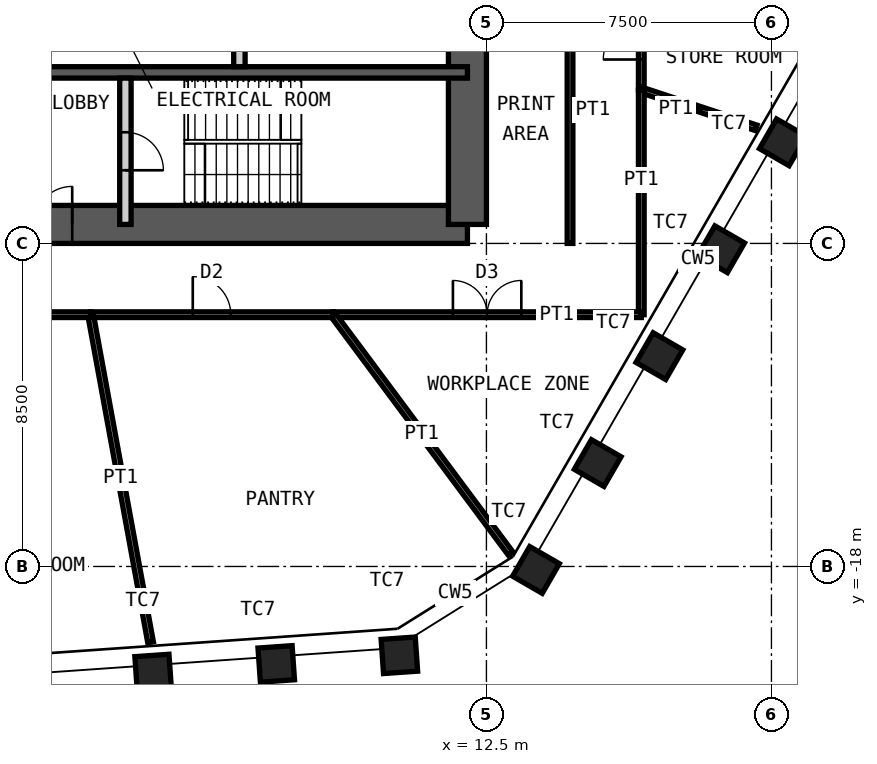
"""IFC4 building model, lengths in metres.
Left out: names, types, materials, properties, quantities, classifications, styles, units other than length and angle.
Written with IfcOpenShell. Run it as: python <this file> out.ifc"""

import sys

from ifc_helpers import new_model, si_unit, direction, frame, frame_2d, origin, origin_2d, place, context, subcontext, project, spatial, rectangle, hollow_rectangle, extrude, element, fill, save


model = new_model("IFC4")
c1 = context("Model", 3, precision=1e-05, world=origin(), true_north=direction((0.0, 1.0)))
c2 = subcontext(c1, "Body", "Model", "MODEL_VIEW")
j1 = project(units=[si_unit("LENGTHUNIT", "METRE"), si_unit("PLANEANGLEUNIT", "RADIAN")], contexts=[c1])
p1 = place(None, origin())
s1 = spatial("IfcSite", under=j1, at=p1, CompositionType="ELEMENT")
p2 = place(p1, origin())
s2 = spatial("IfcBuilding", under=s1, at=p2, CompositionType="ELEMENT")
p3 = place(p2, frame((0.0, 0.0, 283.0)))
s3 = spatial("IfcBuildingStorey", under=s2, at=p3, CompositionType="ELEMENT", Elevation=283.0)
for number, where, z_axis, x_axis in (
    (1, (20.3, -6.84, 0.0), (0.0, 0.0, 1.0), (0.5, 0.866, 0.0)),
    (2, (18.676, -9.653, 0.0), (0.0, 0.0, 1.0), (0.5, 0.866, 0.0)),
    (3, (17.052, -12.466, 0.0), (0.0, 0.0, 1.0), (0.5, 0.866, 0.0)),
    (4, (15.427, -15.279, 0.0), (0.0, 0.0, 1.0), (0.5, 0.866, 0.0)),
    (5, (13.803, -18.092, 0.0), (0.0, 0.0, 1.0), (0.5, 0.866, 0.0)),
    (6, (10.209, -20.337, 0.0), (0.0, 0.0, 1.0), (0.998, 0.07, 0.0)),
    (7, (6.969, -20.564, 0.0), (0.0, 0.0, 1.0), (0.998, 0.07, 0.0)),
    (8, (3.729, -20.791, 0.0), (0.0, 0.0, 1.0), (0.998, 0.07, 0.0)),
):
    element("IfcColumn", number, at=place(p3, frame(where, z_axis=z_axis, x_axis=x_axis)), inside=s3, PredefinedType="COLUMN", context=c2, shape_type="SweptSolid", body=[
        extrude(hollow_rectangle(XDim=0.9, YDim=0.9, WallThickness=0.06, at=origin_2d()), origin(), (0.0, 0.0, 1.0), 4.2),
    ])
p4 = place(p3, frame((-12.0, -9.0, 0.0), z_axis=(0.0, 0.0, 1.0), x_axis=(1.0, 0.0, 0.0)))
e9 = element("IfcWall", 9, at=p4, inside=s3, PredefinedType="SHEAR", context=c2, shape_type="SweptSolid", body=[
    extrude(rectangle(XDim=24.0, YDim=1.0, at=frame_2d((12.0, 0.0))), origin(), (0.0, 0.0, 1.0), 4.2),
])
p5 = place(p4, frame((1.35, 0.0, 0.0)))
e10 = element("IfcOpeningElement", 10, at=p5, cuts=e9, PredefinedType="OPENING", context=c2, shape_type="SweptSolid", body=[
    extrude(rectangle(XDim=1.0, YDim=2.1, at=frame_2d((0.5, 1.05))), frame((0.0, 0.51, 0.0), z_axis=(0.0, -1.0, 0.0), x_axis=(1.0, 0.0, 0.0)), (0.0, 0.0, 1.0), 1.02),
])
p6 = place(p4, frame((5.325, 0.0, 0.0)))
e11 = element("IfcOpeningElement", 11, at=p6, cuts=e9, PredefinedType="OPENING", context=c2, shape_type="SweptSolid", body=[
    extrude(rectangle(XDim=1.15, YDim=2.1, at=frame_2d((0.575, 1.05))), frame((0.0, 0.51, 0.0), z_axis=(0.0, -1.0, 0.0), x_axis=(1.0, 0.0, 0.0)), (0.0, 0.0, 1.0), 1.02),
])
p7 = place(p4, frame((12.6, 0.0, 0.0)))
e12 = element("IfcOpeningElement", 12, at=p7, cuts=e9, PredefinedType="OPENING", context=c2, shape_type="SweptSolid", body=[
    extrude(rectangle(XDim=1.0, YDim=2.1, at=frame_2d((0.5, 1.05))), frame((0.0, 0.51, 0.0), z_axis=(0.0, -1.0, 0.0), x_axis=(1.0, 0.0, 0.0)), (0.0, 0.0, 1.0), 1.02),
])
p8 = place(p3, frame((12.0, -9.0, 0.0), z_axis=(0.0, 0.0, 1.0), x_axis=(0.0, 1.0, 0.0)))
e13 = element("IfcWall", 13, at=p8, inside=s3, PredefinedType="SHEAR", context=c2, shape_type="SweptSolid", body=[
    extrude(rectangle(XDim=18.0, YDim=1.0, at=frame_2d((9.0, 0.0))), origin(), (0.0, 0.0, 1.0), 4.2),
])
p9 = place(p8, frame((8.1, 0.0, 0.0)))
e14 = element("IfcOpeningElement", 14, at=p9, cuts=e13, PredefinedType="OPENING", context=c2, shape_type="SweptSolid", body=[
    extrude(rectangle(XDim=1.8, YDim=2.1, at=frame_2d((0.9, 1.05))), frame((0.0, 0.51, 0.0), z_axis=(0.0, -1.0, 0.0), x_axis=(1.0, 0.0, 0.0)), (0.0, 0.0, 1.0), 1.02),
])
p10 = place(p3, frame((-12.0, -5.0, 0.0), z_axis=(0.0, 0.0, 1.0), x_axis=(1.0, 0.0, 0.0)))
e15 = element("IfcWall", 15, at=p10, inside=s3, PredefinedType="SHEAR", context=c2, shape_type="SweptSolid", body=[
    extrude(rectangle(XDim=24.0, YDim=0.3, at=frame_2d((12.0, 0.0))), origin(), (0.0, 0.0, 1.0), 4.2),
])
p11 = place(p3, frame((6.0, -4.85, 0.0), z_axis=(0.0, 0.0, 1.0), x_axis=(0.0, 1.0, 0.0)))
e16 = element("IfcWall", 16, at=p11, inside=s3, PredefinedType="PARTITIONING", context=c2, shape_type="SweptSolid", body=[
    extrude(rectangle(XDim=2.65, YDim=0.3, at=frame_2d((1.325, 0.0))), origin(), (0.0, 0.0, 1.0), 3.98),
])
p12 = place(p3, frame((3.0, -9.0, 0.0), z_axis=(0.0, 0.0, 1.0), x_axis=(0.0, 1.0, 0.0)))
e17 = element("IfcWall", 17, at=p12, inside=s3, PredefinedType="PARTITIONING", context=c2, shape_type="SweptSolid", body=[
    extrude(rectangle(XDim=3.85, YDim=0.3, at=frame_2d((1.925, 0.0))), origin(), (0.0, 0.0, 1.0), 3.98),
])
p13 = place(p12, frame((1.425, 0.0, 0.0)))
e18 = element("IfcOpeningElement", 18, at=p13, cuts=e17, PredefinedType="OPENING", context=c2, shape_type="SweptSolid", body=[
    extrude(rectangle(XDim=1.0, YDim=2.1, at=frame_2d((0.5, 1.05))), frame((0.0, 0.16, 0.0), z_axis=(0.0, -1.0, 0.0), x_axis=(1.0, 0.0, 0.0)), (0.0, 0.0, 1.0), 0.32),
])
p14 = place(p3, frame((16.575, -2.859, 0.0), z_axis=(0.0, 0.0, 1.0), x_axis=(0.0, -1.0, 0.0)))
e19 = element("IfcWall", 19, at=p14, inside=s3, PredefinedType="PARTITIONING", context=c2, shape_type="SweptSolid", body=[
    extrude(rectangle(XDim=2.603, YDim=0.15, at=frame_2d((1.302, 0.0))), origin(), (0.0, 0.0, 1.0), 4.03),
])
p15 = place(p14, frame((0.802, 0.0, 0.0)))
e20 = element("IfcOpeningElement", 20, at=p15, cuts=e19, PredefinedType="OPENING", context=c2, shape_type="SweptSolid", body=[
    extrude(rectangle(XDim=1.0, YDim=2.4, at=frame_2d((0.5, 1.2))), frame((0.0, 0.085, 0.0), z_axis=(0.0, -1.0, 0.0), x_axis=(1.0, 0.0, 0.0)), (0.0, 0.0, 1.0), 0.17),
])
p16 = place(p3, frame((19.598, -6.459, 0.0), z_axis=(0.0, 0.0, 1.0), x_axis=(-0.949759114669, 0.312981827113, 0.0)))
e21 = element("IfcWall", 21, at=p16, inside=s3, PredefinedType="PARTITIONING", context=c2, shape_type="SweptSolid", body=[
    extrude(rectangle(XDim=3.183, YDim=0.15, at=frame_2d((1.592, 0.0))), origin(), (0.0, 0.0, 1.0), 3.33),
])
p17 = place(p3, frame((16.575, -5.462, 0.0), z_axis=(0.0, 0.0, 1.0), x_axis=(0.0, -1.0, 0.0)))
e22 = element("IfcWall", 22, at=p17, inside=s3, PredefinedType="PARTITIONING", context=c2, shape_type="SweptSolid", body=[
    extrude(rectangle(XDim=5.913, YDim=0.15, at=frame_2d((2.956, 0.0))), origin(), (0.0, 0.0, 1.0), 4.03),
])
p18 = place(p3, frame((16.575, -11.375, 0.0), z_axis=(0.0, 0.0, 1.0), x_axis=(-1.0, 0.0, 0.0)))
e23 = element("IfcWall", 23, at=p18, inside=s3, PredefinedType="PARTITIONING", context=c2, shape_type="SweptSolid", body=[
    extrude(rectangle(XDim=8.114, YDim=0.15, at=frame_2d((4.057, 0.0))), origin(), (0.0, 0.0, 1.0), 4.03),
])
p19 = place(p18, frame((3.157, 0.0, 0.0)))
e24 = element("IfcOpeningElement", 24, at=p19, cuts=e23, PredefinedType="OPENING", context=c2, shape_type="SweptSolid", body=[
    extrude(rectangle(XDim=1.8, YDim=2.4, at=frame_2d((0.9, 1.2))), frame((0.0, 0.085, 0.0), z_axis=(0.0, -1.0, 0.0), x_axis=(1.0, 0.0, 0.0)), (0.0, 0.0, 1.0), 0.17),
])
p20 = place(p3, frame((13.138, -17.661, 0.0), z_axis=(0.0, 0.0, 1.0), x_axis=(-0.596849390438, 0.802353291969, 0.0)))
e25 = element("IfcWall", 25, at=p20, inside=s3, PredefinedType="PARTITIONING", context=c2, shape_type="SweptSolid", body=[
    extrude(rectangle(XDim=7.835, YDim=0.15, at=frame_2d((3.917, 0.0))), origin(), (0.0, 0.0, 1.0), 2.93),
])
p21 = place(p3, frame((8.461, -11.375, 0.0), z_axis=(0.0, 0.0, 1.0), x_axis=(-1.0, 0.0, 0.0)))
e26 = element("IfcWall", 26, at=p21, inside=s3, PredefinedType="PARTITIONING", context=c2, shape_type="SweptSolid", body=[
    extrude(rectangle(XDim=6.378, YDim=0.15, at=frame_2d((3.189, 0.0))), origin(), (0.0, 0.0, 1.0), 4.03),
])
p22 = place(p21, frame((2.689, 0.0, 0.0)))
e27 = element("IfcOpeningElement", 27, at=p22, cuts=e26, PredefinedType="OPENING", context=c2, shape_type="SweptSolid", body=[
    extrude(rectangle(XDim=1.0, YDim=2.4, at=frame_2d((0.5, 1.2))), frame((0.0, 0.085, 0.0), z_axis=(0.0, -1.0, 0.0), x_axis=(1.0, 0.0, 0.0)), (0.0, 0.0, 1.0), 0.17),
])
p23 = place(p3, frame((3.662, -19.994, 0.0), z_axis=(0.0, 0.0, 1.0), x_axis=(-0.18018724377, 0.983632328252, 0.0)))
e28 = element("IfcWall", 28, at=p23, inside=s3, PredefinedType="PARTITIONING", context=c2, shape_type="SweptSolid", body=[
    extrude(rectangle(XDim=8.762, YDim=0.15, at=frame_2d((4.381, 0.0))), origin(), (0.0, 0.0, 1.0), 3.33),
])
p24 = place(p3, frame((2.083, -11.375, 0.0), z_axis=(0.0, 0.0, 1.0), x_axis=(-1.0, 0.0, 0.0)))
e29 = element("IfcWall", 29, at=p24, inside=s3, PredefinedType="PARTITIONING", context=c2, shape_type="SweptSolid", body=[
    extrude(rectangle(XDim=3.634, YDim=0.15, at=frame_2d((1.817, 0.0))), origin(), (0.0, 0.0, 1.0), 4.03),
])
p25 = place(p24, frame((1.317, 0.0, 0.0)))
e30 = element("IfcOpeningElement", 30, at=p25, cuts=e29, PredefinedType="OPENING", context=c2, shape_type="SweptSolid", body=[
    extrude(rectangle(XDim=1.0, YDim=2.4, at=frame_2d((0.5, 1.2))), frame((0.0, 0.085, 0.0), z_axis=(0.0, -1.0, 0.0), x_axis=(1.0, 0.0, 0.0)), (0.0, 0.0, 1.0), 0.17),
])
p26 = place(p3, frame((14.7, -9.5, 0.0), z_axis=(0.0, 0.0, 1.0), x_axis=(0.0, 1.0, 0.0)))
e31 = element("IfcWall", 31, at=p26, inside=s3, PredefinedType="PARTITIONING", context=c2, shape_type="SweptSolid", body=[
    extrude(rectangle(XDim=7.0, YDim=0.15, at=frame_2d((3.5, 0.0))), origin(), (0.0, 0.0, 1.0), 4.03),
])
p27 = place(p7, origin())
e32 = element("IfcDoor", 32, at=p27, inside=s3, OperationType="SINGLE_SWING_LEFT", PredefinedType="DOOR", context=c2, shape_type="SweptSolid", body=[
    extrude(rectangle(XDim=1.0, YDim=2.1, at=frame_2d((0.5, 1.05))), frame((0.0, 0.025, 0.0), z_axis=(0.0, -1.0, 0.0), x_axis=(1.0, 0.0, 0.0)), (0.0, 0.0, 1.0), 0.05),
])
fill(e12, e32)
p28 = place(p13, origin())
e33 = element("IfcDoor", 33, at=p28, inside=s3, OperationType="SINGLE_SWING_LEFT", PredefinedType="DOOR", context=c2, shape_type="SweptSolid", body=[
    extrude(rectangle(XDim=1.0, YDim=2.1, at=frame_2d((0.5, 1.05))), frame((0.0, 0.025, 0.0), z_axis=(0.0, -1.0, 0.0), x_axis=(1.0, 0.0, 0.0)), (0.0, 0.0, 1.0), 0.05),
])
fill(e18, e33)
p29 = place(p15, origin())
e34 = element("IfcDoor", 34, at=p29, inside=s3, OperationType="SINGLE_SWING_RIGHT", PredefinedType="DOOR", context=c2, shape_type="SweptSolid", body=[
    extrude(rectangle(XDim=1.0, YDim=2.4, at=frame_2d((0.5, 1.2))), frame((0.0, 0.025, 0.0), z_axis=(0.0, -1.0, 0.0), x_axis=(1.0, 0.0, 0.0)), (0.0, 0.0, 1.0), 0.05),
])
fill(e20, e34)
p30 = place(p19, origin())
e35 = element("IfcDoor", 35, at=p30, inside=s3, OperationType="DOUBLE_DOOR_DOUBLE_SWING", PredefinedType="DOOR", context=c2, shape_type="SweptSolid", body=[
    extrude(rectangle(XDim=1.8, YDim=2.4, at=frame_2d((0.9, 1.2))), frame((0.0, 0.025, 0.0), z_axis=(0.0, -1.0, 0.0), x_axis=(1.0, 0.0, 0.0)), (0.0, 0.0, 1.0), 0.05),
])
fill(e24, e35)
p31 = place(p22, origin())
e36 = element("IfcDoor", 36, at=p31, inside=s3, OperationType="SINGLE_SWING_RIGHT", PredefinedType="DOOR", context=c2, shape_type="SweptSolid", body=[
    extrude(rectangle(XDim=1.0, YDim=2.4, at=frame_2d((0.5, 1.2))), frame((0.0, 0.025, 0.0), z_axis=(0.0, -1.0, 0.0), x_axis=(1.0, 0.0, 0.0)), (0.0, 0.0, 1.0), 0.05),
])
fill(e27, e36)
save(model, sys.argv[1])
